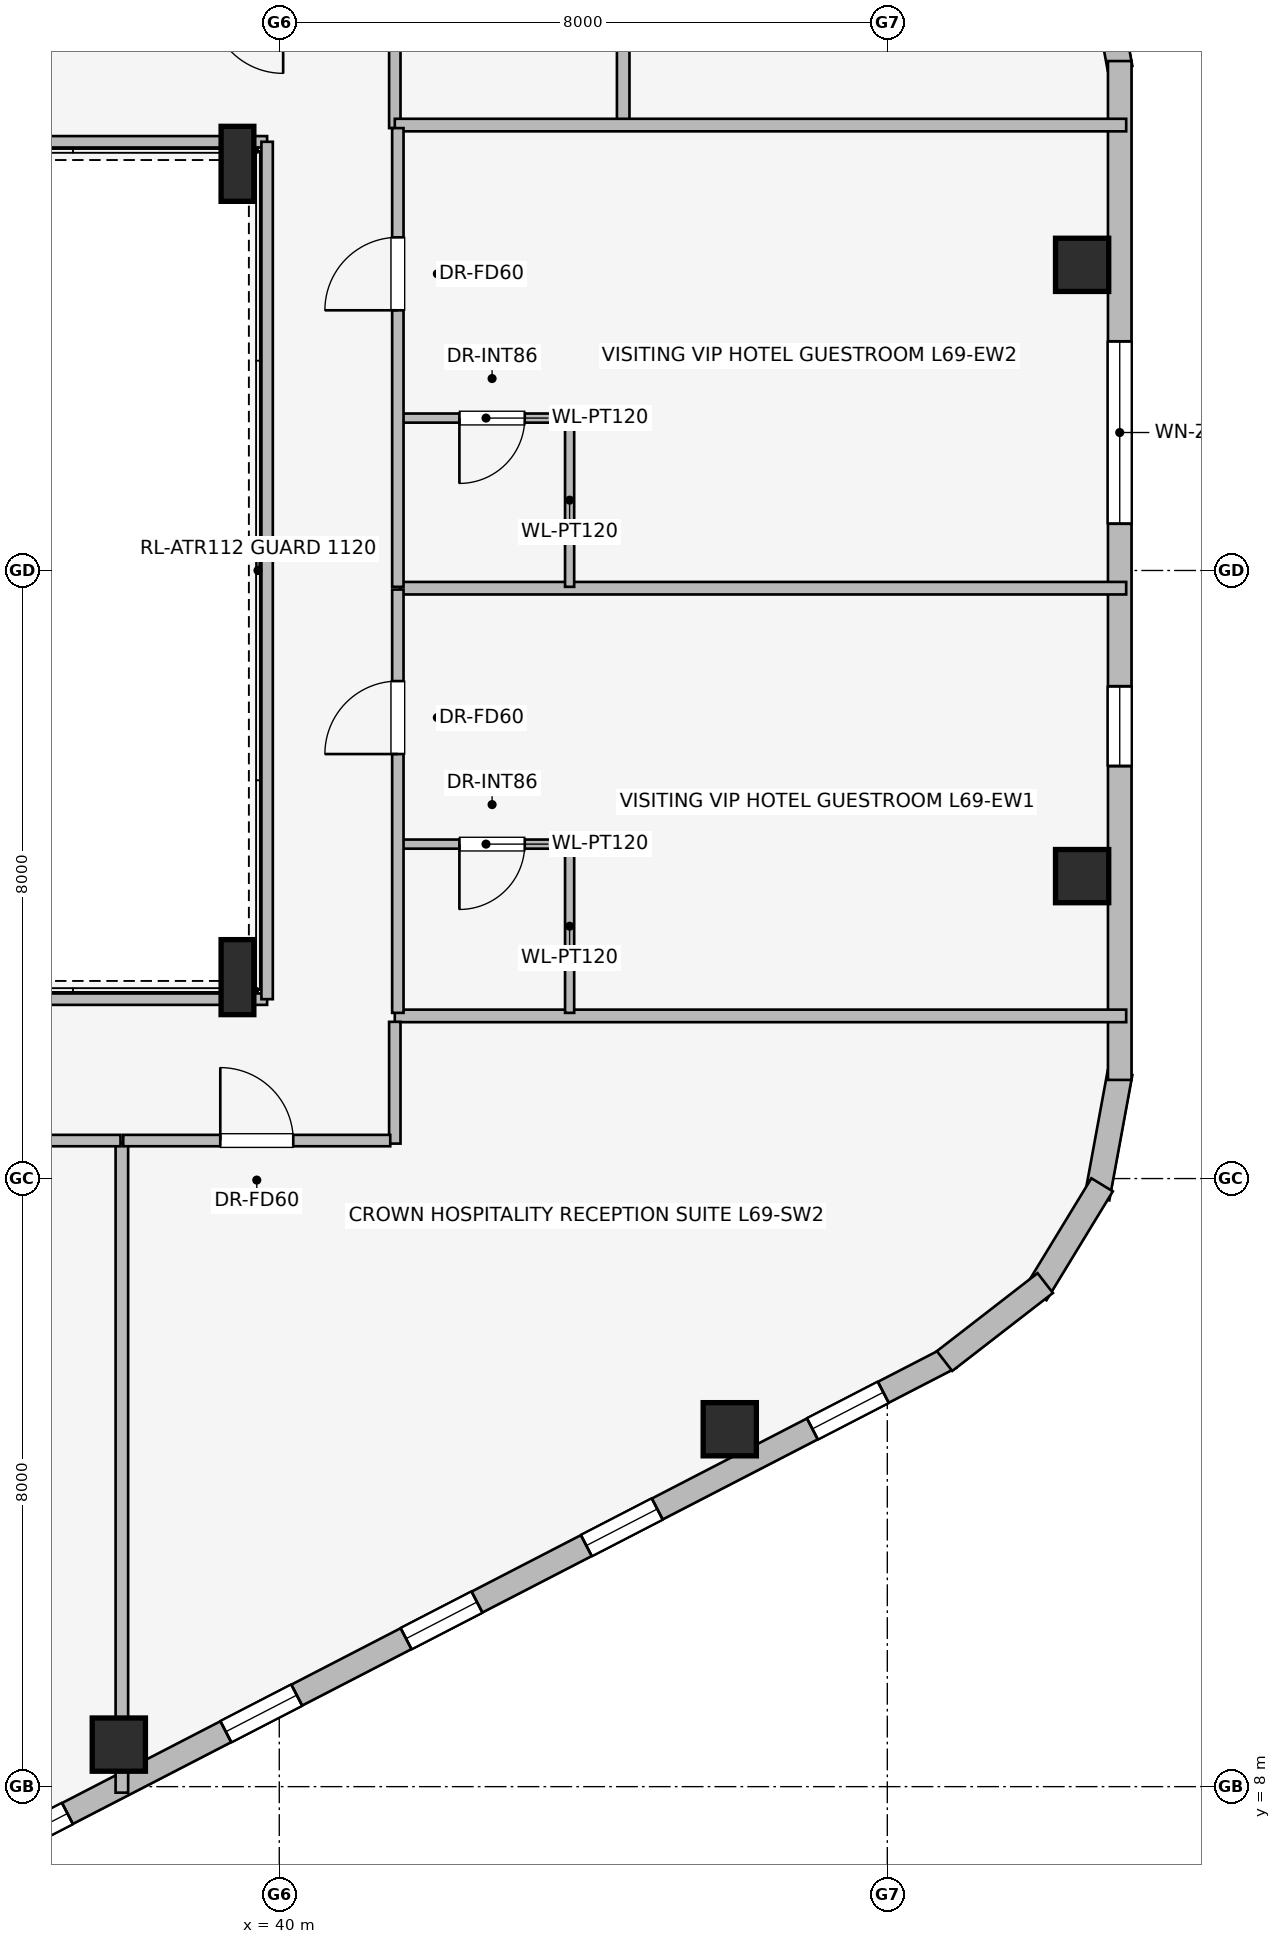
"""IFC4 building model, lengths in metres.
Left out: names, types, materials, properties, quantities, classifications, styles, units other than length and angle.
Written with IfcOpenShell. Run it as: python <this file> out.ifc"""

import sys

from ifc_helpers import new_model, si_unit, direction, frame, frame_2d, origin, origin_2d, place, context, subcontext, project, spatial, rectangle, i_section, extrude, element, fill, save


model = new_model("IFC4")
c1 = context("Model", 3, precision=1e-05, world=origin(), true_north=direction((0.0, 1.0)))
c2 = subcontext(c1, "Body", "Model", "MODEL_VIEW")
j1 = project(units=[si_unit("LENGTHUNIT", "METRE"), si_unit("PLANEANGLEUNIT", "RADIAN")], contexts=[c1])
p1 = place(None, origin())
s1 = spatial("IfcSite", under=j1, at=p1, CompositionType="ELEMENT")
p2 = place(p1, origin())
s2 = spatial("IfcBuilding", under=s1, at=p2, CompositionType="ELEMENT")
p3 = place(p2, frame((0.0, 0.0, 252.55)))
s3 = spatial("IfcBuildingStorey", under=s2, at=p3, CompositionType="ELEMENT", Elevation=252.55)
for number, where, z_axis, x_axis in (
    (1, (37.889, 8.553, 0.0), (0.0, 0.0, 1.0), (1.0, 0.0, 0.0)),
    (2, (45.927, 12.702, 0.0), (0.0, 0.0, 1.0), (1.0, 0.0, 0.0)),
    (3, (50.563, 19.979, 0.0), (0.0, 0.0, 1.0), (1.0, 0.0, 0.0)),
    (4, (50.563, 28.021, 0.0), (0.0, 0.0, 1.0), (1.0, 0.0, 0.0)),
):
    element("IfcColumn", number, at=place(p3, frame(where, z_axis=z_axis, x_axis=x_axis)), inside=s3, PredefinedType="COLUMN", context=c2, shape_type="SweptSolid", body=[
        extrude(rectangle(XDim=0.7, YDim=0.7, at=origin_2d()), origin(), (0.0, 0.0, 1.0), 3.55),
    ])
for number, where, z_axis, x_axis in (
    (5, (39.45, 18.65, 0.0), (0.0, 0.0, 1.0), (1.0, 0.0, 0.0)),
    (6, (39.45, 29.35, 0.0), (0.0, 0.0, 1.0), (1.0, 0.0, 0.0)),
):
    element("IfcColumn", number, at=place(p3, frame(where, z_axis=z_axis, x_axis=x_axis)), inside=s3, PredefinedType="COLUMN", context=c2, shape_type="SweptSolid", body=[
        extrude(i_section(OverallWidth=0.431, OverallDepth=0.987, WebThickness=0.034, FlangeThickness=0.062, at=origin_2d()), origin(), (0.0, 0.0, 1.0), 3.55),
    ])
p4 = place(p3, frame((50.759, 32.257, 0.0), z_axis=(0.0, 0.0, 1.0), x_axis=(0.180691763044, -0.983539773862, 0.0)))
e7 = element("IfcWall", 7, at=p4, inside=s3, PredefinedType="STANDARD", context=c2, shape_type="SweptSolid", body=[
    extrude(rectangle(XDim=1.677, YDim=0.33, at=frame_2d((0.838, 0.0))), origin(), (0.0, 0.0, 1.0), 3.29),
])
p5 = place(p3, frame((48.834, 13.646, 0.0), z_axis=(0.0, 0.0, 1.0), x_axis=(-0.888581481622, -0.458718814218, 0.0)))
e8 = element("IfcWall", 8, at=p5, inside=s3, PredefinedType="STANDARD", context=c2, shape_type="SweptSolid", body=[
    extrude(rectangle(XDim=15.077, YDim=0.31, at=frame_2d((7.539, 0.0))), origin(), (0.0, 0.0, 1.0), 3.29),
])
p6 = place(p5, frame((0.998, 0.0, 0.75)))
e9 = element("IfcOpeningElement", 9, at=p6, cuts=e8, PredefinedType="OPENING", context=c2, shape_type="SweptSolid", body=[
    extrude(rectangle(XDim=1.05, YDim=1.4, at=frame_2d((0.525, 0.7))), frame((0.0, 0.165, 0.0), z_axis=(0.0, -1.0, 0.0), x_axis=(1.0, 0.0, 0.0)), (0.0, 0.0, 1.0), 0.33),
])
p7 = place(p5, frame((4.345, 0.0, 0.75)))
e10 = element("IfcOpeningElement", 10, at=p7, cuts=e8, PredefinedType="OPENING", context=c2, shape_type="SweptSolid", body=[
    extrude(rectangle(XDim=1.05, YDim=1.4, at=frame_2d((0.525, 0.7))), frame((0.0, 0.165, 0.0), z_axis=(0.0, -1.0, 0.0), x_axis=(1.0, 0.0, 0.0)), (0.0, 0.0, 1.0), 0.33),
])
p8 = place(p5, frame((7.014, 0.0, 0.75)))
e11 = element("IfcOpeningElement", 11, at=p8, cuts=e8, PredefinedType="OPENING", context=c2, shape_type="SweptSolid", body=[
    extrude(rectangle(XDim=1.05, YDim=1.4, at=frame_2d((0.525, 0.7))), frame((0.0, 0.165, 0.0), z_axis=(0.0, -1.0, 0.0), x_axis=(1.0, 0.0, 0.0)), (0.0, 0.0, 1.0), 0.33),
])
p9 = place(p5, frame((9.683, 0.0, 0.75)))
e12 = element("IfcOpeningElement", 12, at=p9, cuts=e8, PredefinedType="OPENING", context=c2, shape_type="SweptSolid", body=[
    extrude(rectangle(XDim=1.05, YDim=1.4, at=frame_2d((0.525, 0.7))), frame((0.0, 0.165, 0.0), z_axis=(0.0, -1.0, 0.0), x_axis=(1.0, 0.0, 0.0)), (0.0, 0.0, 1.0), 0.33),
])
p10 = place(p5, frame((13.078, 0.0, 0.75)))
e13 = element("IfcOpeningElement", 13, at=p10, cuts=e8, PredefinedType="OPENING", context=c2, shape_type="SweptSolid", body=[
    extrude(rectangle(XDim=1.05, YDim=1.4, at=frame_2d((0.525, 0.7))), frame((0.0, 0.165, 0.0), z_axis=(0.0, -1.0, 0.0), x_axis=(1.0, 0.0, 0.0)), (0.0, 0.0, 1.0), 0.33),
])
p11 = place(p3, frame((51.062, 17.392, 0.0), z_axis=(0.0, 0.0, 1.0), x_axis=(-0.180691763044, -0.983539773862, 0.0)))
e14 = element("IfcWall", 14, at=p11, inside=s3, PredefinedType="STANDARD", context=c2, shape_type="SweptSolid", body=[
    extrude(rectangle(XDim=1.677, YDim=0.33, at=frame_2d((0.838, 0.0))), origin(), (0.0, 0.0, 1.0), 3.29),
])
p12 = place(p3, frame((50.826, 15.918, 0.0), z_axis=(0.0, 0.0, 1.0), x_axis=(-0.520325409202, -0.853968072318, 0.0)))
e15 = element("IfcWall", 15, at=p12, inside=s3, PredefinedType="STANDARD", context=c2, shape_type="SweptSolid", body=[
    extrude(rectangle(XDim=1.678, YDim=0.33, at=frame_2d((0.839, 0.0))), origin(), (0.0, 0.0, 1.0), 3.29),
])
p13 = place(p3, frame((50.078, 14.625, 0.0), z_axis=(0.0, 0.0, 1.0), x_axis=(-0.790691856293, -0.61221433207, 0.0)))
e16 = element("IfcWall", 16, at=p13, inside=s3, PredefinedType="STANDARD", context=c2, shape_type="SweptSolid", body=[
    extrude(rectangle(XDim=1.676, YDim=0.33, at=frame_2d((0.838, 0.0))), origin(), (0.0, 0.0, 1.0), 3.29),
])
p14 = place(p3, frame((51.058, 30.702, 0.0), z_axis=(0.0, 0.0, 1.0), x_axis=(0.0, -1.0, 0.0)))
e17 = element("IfcWall", 17, at=p14, inside=s3, PredefinedType="STANDARD", context=c2, shape_type="SweptSolid", body=[
    extrude(rectangle(XDim=13.404, YDim=0.31, at=frame_2d((6.702, 0.0))), origin(), (0.0, 0.0, 1.0), 3.29),
])
p15 = place(p14, frame((3.687, 0.0, 0.75)))
e18 = element("IfcOpeningElement", 18, at=p15, cuts=e17, PredefinedType="OPENING", context=c2, shape_type="SweptSolid", body=[
    extrude(rectangle(XDim=2.4, YDim=1.6, at=frame_2d((1.2, 0.8))), frame((0.0, 0.165, 0.0), z_axis=(0.0, -1.0, 0.0), x_axis=(1.0, 0.0, 0.0)), (0.0, 0.0, 1.0), 0.33),
])
p16 = place(p14, frame((8.225, 0.0, 0.75)))
e19 = element("IfcOpeningElement", 19, at=p16, cuts=e17, PredefinedType="OPENING", context=c2, shape_type="SweptSolid", body=[
    extrude(rectangle(XDim=1.05, YDim=1.4, at=frame_2d((0.525, 0.7))), frame((0.0, 0.165, 0.0), z_axis=(0.0, -1.0, 0.0), x_axis=(1.0, 0.0, 0.0)), (0.0, 0.0, 1.0), 0.33),
])
p17 = place(p3, frame((27.675, 18.36, 0.0), z_axis=(0.0, 0.0, 1.0), x_axis=(1.0, 0.0, 0.0)))
e20 = element("IfcWall", 20, at=p17, inside=s3, PredefinedType="PARTITIONING", context=c2, shape_type="SweptSolid", body=[
    extrude(rectangle(XDim=12.165, YDim=0.15, at=frame_2d((6.083, 0.0))), origin(), (0.0, 0.0, 1.0), 2.431),
])
p18 = place(p3, frame((39.84, 29.64, 0.0), z_axis=(0.0, 0.0, 1.0), x_axis=(-1.0, 0.0, 0.0)))
e21 = element("IfcWall", 21, at=p18, inside=s3, PredefinedType="PARTITIONING", context=c2, shape_type="SweptSolid", body=[
    extrude(rectangle(XDim=12.203, YDim=0.15, at=frame_2d((6.102, 0.0))), origin(), (0.0, 0.0, 1.0), 2.431),
])
p19 = place(p3, frame((39.84, 18.36, 0.0), z_axis=(0.0, 0.0, 1.0), x_axis=(0.0, 1.0, 0.0)))
e22 = element("IfcWall", 22, at=p19, inside=s3, PredefinedType="PARTITIONING", context=c2, shape_type="SweptSolid", body=[
    extrude(rectangle(XDim=11.28, YDim=0.15, at=frame_2d((5.64, 0.0))), origin(), (0.0, 0.0, 1.0), 3.29),
])
p20 = place(p3, frame((41.52, 29.82, 0.0), z_axis=(0.0, 0.0, 1.0), x_axis=(0.0, 1.0, 0.0)))
e23 = element("IfcWall", 23, at=p20, inside=s3, PredefinedType="PARTITIONING", context=c2, shape_type="SweptSolid", body=[
    extrude(rectangle(XDim=1.72, YDim=0.15, at=frame_2d((0.86, 0.0))), origin(), (0.0, 0.0, 1.0), 3.29),
])
p21 = place(p3, frame((44.525, 29.89, 0.0), z_axis=(0.0, 0.0, 1.0), x_axis=(0.0, 1.0, 0.0)))
e24 = element("IfcWall", 24, at=p21, inside=s3, PredefinedType="PARTITIONING", context=c2, shape_type="SweptSolid", body=[
    extrude(rectangle(XDim=6.784, YDim=0.165, at=frame_2d((3.392, 0.0))), origin(), (0.0, 0.0, 1.0), 3.29),
])
for number, where, z_axis, x_axis in (
    (25, (41.52, 18.14, 0.0), (0.0, 0.0, 1.0), (1.0, 0.0, 0.0)),
    (26, (41.52, 29.86, 0.0), (0.0, 0.0, 1.0), (1.0, 0.0, 0.0)),
):
    element("IfcWall", number, at=place(p3, frame(where, z_axis=z_axis, x_axis=x_axis)), inside=s3, PredefinedType="PARTITIONING", context=c2, shape_type="SweptSolid", body=[
        extrude(rectangle(XDim=9.623, YDim=0.165, at=frame_2d((4.812, 0.0))), origin(), (0.0, 0.0, 1.0), 3.29),
    ])
p22 = place(p3, frame((41.59, 23.767, 0.0), z_axis=(0.0, 0.0, 1.0), x_axis=(1.0, 0.0, 0.0)))
e27 = element("IfcWall", 27, at=p22, inside=s3, PredefinedType="PARTITIONING", context=c2, shape_type="SweptSolid", body=[
    extrude(rectangle(XDim=9.553, YDim=0.165, at=frame_2d((4.776, 0.0))), origin(), (0.0, 0.0, 1.0), 2.594),
])
p23 = place(p3, frame((43.82, 18.18, 0.0), z_axis=(0.0, 0.0, 1.0), x_axis=(0.0, 1.0, 0.0)))
e28 = element("IfcWall", 28, at=p23, inside=s3, PredefinedType="PARTITIONING", context=c2, shape_type="SweptSolid", body=[
    extrude(rectangle(XDim=2.28, YDim=0.12, at=frame_2d((1.14, 0.0))), origin(), (0.0, 0.0, 1.0), 2.887),
])
p24 = place(p3, frame((43.88, 20.4, 0.0), z_axis=(0.0, 0.0, 1.0), x_axis=(-1.0, 0.0, 0.0)))
e29 = element("IfcWall", 29, at=p24, inside=s3, PredefinedType="PARTITIONING", context=c2, shape_type="SweptSolid", body=[
    extrude(rectangle(XDim=2.32, YDim=0.12, at=frame_2d((1.16, 0.0))), origin(), (0.0, 0.0, 1.0), 3.29),
])
p25 = place(p24, frame((0.65, 0.0, 0.0)))
e30 = element("IfcOpeningElement", 30, at=p25, cuts=e29, PredefinedType="OPENING", context=c2, shape_type="SweptSolid", body=[
    extrude(rectangle(XDim=0.86, YDim=2.0, at=frame_2d((0.43, 1.0))), frame((0.0, 0.07, 0.0), z_axis=(0.0, -1.0, 0.0), x_axis=(1.0, 0.0, 0.0)), (0.0, 0.0, 1.0), 0.14),
])
p26 = place(p3, frame((41.56, 18.18, 0.0), z_axis=(0.0, 0.0, 1.0), x_axis=(0.0, 1.0, 0.0)))
e31 = element("IfcWall", 31, at=p26, inside=s3, PredefinedType="PARTITIONING", context=c2, shape_type="SweptSolid", body=[
    extrude(rectangle(XDim=5.569, YDim=0.15, at=frame_2d((2.785, 0.0))), origin(), (0.0, 0.0, 1.0), 3.29),
])
p27 = place(p26, frame((3.405, 0.0, 0.0)))
e32 = element("IfcOpeningElement", 32, at=p27, cuts=e31, PredefinedType="OPENING", context=c2, shape_type="SweptSolid", body=[
    extrude(rectangle(XDim=0.96, YDim=2.0, at=frame_2d((0.48, 1.0))), frame((0.0, 0.085, 0.0), z_axis=(0.0, -1.0, 0.0), x_axis=(1.0, 0.0, 0.0)), (0.0, 0.0, 1.0), 0.17),
])
p28 = place(p3, frame((43.82, 23.785, 0.0), z_axis=(0.0, 0.0, 1.0), x_axis=(0.0, 1.0, 0.0)))
e33 = element("IfcWall", 33, at=p28, inside=s3, PredefinedType="PARTITIONING", context=c2, shape_type="SweptSolid", body=[
    extrude(rectangle(XDim=2.28, YDim=0.12, at=frame_2d((1.14, 0.0))), origin(), (0.0, 0.0, 1.0), 2.887),
])
p29 = place(p3, frame((43.88, 26.005, 0.0), z_axis=(0.0, 0.0, 1.0), x_axis=(-1.0, 0.0, 0.0)))
e34 = element("IfcWall", 34, at=p29, inside=s3, PredefinedType="PARTITIONING", context=c2, shape_type="SweptSolid", body=[
    extrude(rectangle(XDim=2.32, YDim=0.12, at=frame_2d((1.16, 0.0))), origin(), (0.0, 0.0, 1.0), 3.29),
])
p30 = place(p29, frame((0.65, 0.0, 0.0)))
e35 = element("IfcOpeningElement", 35, at=p30, cuts=e34, PredefinedType="OPENING", context=c2, shape_type="SweptSolid", body=[
    extrude(rectangle(XDim=0.86, YDim=2.0, at=frame_2d((0.43, 1.0))), frame((0.0, 0.07, 0.0), z_axis=(0.0, -1.0, 0.0), x_axis=(1.0, 0.0, 0.0)), (0.0, 0.0, 1.0), 0.14),
])
p31 = place(p3, frame((41.56, 23.785, 0.0), z_axis=(0.0, 0.0, 1.0), x_axis=(0.0, 1.0, 0.0)))
e36 = element("IfcWall", 36, at=p31, inside=s3, PredefinedType="PARTITIONING", context=c2, shape_type="SweptSolid", body=[
    extrude(rectangle(XDim=6.035, YDim=0.15, at=frame_2d((3.018, 0.0))), origin(), (0.0, 0.0, 1.0), 3.29),
])
p32 = place(p31, frame((3.638, 0.0, 0.0)))
e37 = element("IfcOpeningElement", 37, at=p32, cuts=e36, PredefinedType="OPENING", context=c2, shape_type="SweptSolid", body=[
    extrude(rectangle(XDim=0.96, YDim=2.0, at=frame_2d((0.48, 1.0))), frame((0.0, 0.085, 0.0), z_axis=(0.0, -1.0, 0.0), x_axis=(1.0, 0.0, 0.0)), (0.0, 0.0, 1.0), 0.17),
])
p33 = place(p3, frame((41.52, 16.46, 0.0), z_axis=(0.0, 0.0, 1.0), x_axis=(0.0, 1.0, 0.0)))
e38 = element("IfcWall", 38, at=p33, inside=s3, PredefinedType="PARTITIONING", context=c2, shape_type="SweptSolid", body=[
    extrude(rectangle(XDim=1.602, YDim=0.15, at=frame_2d((0.801, 0.0))), origin(), (0.0, 0.0, 1.0), 3.29),
])
p34 = place(p3, frame((37.929, 7.921, 0.0), z_axis=(0.0, 0.0, 1.0), x_axis=(0.0, 1.0, 0.0)))
e39 = element("IfcWall", 39, at=p34, inside=s3, PredefinedType="PARTITIONING", context=c2, shape_type="SweptSolid", body=[
    extrude(rectangle(XDim=8.549, YDim=0.165, at=frame_2d((4.274, 0.0))), origin(), (0.0, 0.0, 1.0), 2.679),
])
p35 = place(p3, frame((32.85, 16.5, 0.0), z_axis=(0.0, 0.0, 1.0), x_axis=(1.0, 0.0, 0.0)))
e40 = element("IfcWall", 40, at=p35, inside=s3, PredefinedType="PARTITIONING", context=c2, shape_type="SweptSolid", body=[
    extrude(rectangle(XDim=5.061, YDim=0.15, at=frame_2d((2.53, 0.0))), origin(), (0.0, 0.0, 1.0), 3.29),
])
p36 = place(p35, frame((2.051, 0.0, 0.0)))
e41 = element("IfcOpeningElement", 41, at=p36, cuts=e40, PredefinedType="OPENING", context=c2, shape_type="SweptSolid", body=[
    extrude(rectangle(XDim=0.96, YDim=2.0, at=frame_2d((0.48, 1.0))), frame((0.0, 0.085, 0.0), z_axis=(0.0, -1.0, 0.0), x_axis=(1.0, 0.0, 0.0)), (0.0, 0.0, 1.0), 0.17),
])
p37 = place(p3, frame((37.947, 16.5, 0.0), z_axis=(0.0, 0.0, 1.0), x_axis=(1.0, 0.0, 0.0)))
e42 = element("IfcWall", 42, at=p37, inside=s3, PredefinedType="PARTITIONING", context=c2, shape_type="SweptSolid", body=[
    extrude(rectangle(XDim=3.513, YDim=0.15, at=frame_2d((1.756, 0.0))), origin(), (0.0, 0.0, 1.0), 3.29),
])
p38 = place(p37, frame((1.277, 0.0, 0.0)))
e43 = element("IfcOpeningElement", 43, at=p38, cuts=e42, PredefinedType="OPENING", context=c2, shape_type="SweptSolid", body=[
    extrude(rectangle(XDim=0.96, YDim=2.0, at=frame_2d((0.48, 1.0))), frame((0.0, 0.085, 0.0), z_axis=(0.0, -1.0, 0.0), x_axis=(1.0, 0.0, 0.0)), (0.0, 0.0, 1.0), 0.17),
])
p39 = place(p6, origin())
e44 = element("IfcWindow", 44, at=p39, inside=s3, PartitioningType="SINGLE_PANEL", PredefinedType="WINDOW", context=c2, shape_type="SweptSolid", body=[
    extrude(rectangle(XDim=1.05, YDim=1.4, at=frame_2d((0.525, 0.7))), frame((0.0, 0.03, 0.0), z_axis=(0.0, -1.0, 0.0), x_axis=(1.0, 0.0, 0.0)), (0.0, 0.0, 1.0), 0.06),
])
fill(e9, e44)
p40 = place(p7, origin())
e45 = element("IfcWindow", 45, at=p40, inside=s3, PartitioningType="SINGLE_PANEL", PredefinedType="WINDOW", context=c2, shape_type="SweptSolid", body=[
    extrude(rectangle(XDim=1.05, YDim=1.4, at=frame_2d((0.525, 0.7))), frame((0.0, 0.03, 0.0), z_axis=(0.0, -1.0, 0.0), x_axis=(1.0, 0.0, 0.0)), (0.0, 0.0, 1.0), 0.06),
])
fill(e10, e45)
p41 = place(p8, origin())
e46 = element("IfcWindow", 46, at=p41, inside=s3, PartitioningType="SINGLE_PANEL", PredefinedType="WINDOW", context=c2, shape_type="SweptSolid", body=[
    extrude(rectangle(XDim=1.05, YDim=1.4, at=frame_2d((0.525, 0.7))), frame((0.0, 0.03, 0.0), z_axis=(0.0, -1.0, 0.0), x_axis=(1.0, 0.0, 0.0)), (0.0, 0.0, 1.0), 0.06),
])
fill(e11, e46)
p42 = place(p9, origin())
e47 = element("IfcWindow", 47, at=p42, inside=s3, PartitioningType="SINGLE_PANEL", PredefinedType="WINDOW", context=c2, shape_type="SweptSolid", body=[
    extrude(rectangle(XDim=1.05, YDim=1.4, at=frame_2d((0.525, 0.7))), frame((0.0, 0.03, 0.0), z_axis=(0.0, -1.0, 0.0), x_axis=(1.0, 0.0, 0.0)), (0.0, 0.0, 1.0), 0.06),
])
fill(e12, e47)
p43 = place(p10, origin())
e48 = element("IfcWindow", 48, at=p43, inside=s3, PartitioningType="SINGLE_PANEL", PredefinedType="WINDOW", context=c2, shape_type="SweptSolid", body=[
    extrude(rectangle(XDim=1.05, YDim=1.4, at=frame_2d((0.525, 0.7))), frame((0.0, 0.03, 0.0), z_axis=(0.0, -1.0, 0.0), x_axis=(1.0, 0.0, 0.0)), (0.0, 0.0, 1.0), 0.06),
])
fill(e13, e48)
p44 = place(p15, origin())
e49 = element("IfcWindow", 49, at=p44, inside=s3, PartitioningType="SINGLE_PANEL", PredefinedType="WINDOW", context=c2, shape_type="SweptSolid", body=[
    extrude(rectangle(XDim=2.4, YDim=1.6, at=frame_2d((1.2, 0.8))), frame((0.0, 0.03, 0.0), z_axis=(0.0, -1.0, 0.0), x_axis=(1.0, 0.0, 0.0)), (0.0, 0.0, 1.0), 0.06),
])
fill(e18, e49)
p45 = place(p16, origin())
e50 = element("IfcWindow", 50, at=p45, inside=s3, PartitioningType="SINGLE_PANEL", PredefinedType="WINDOW", context=c2, shape_type="SweptSolid", body=[
    extrude(rectangle(XDim=1.05, YDim=1.4, at=frame_2d((0.525, 0.7))), frame((0.0, 0.03, 0.0), z_axis=(0.0, -1.0, 0.0), x_axis=(1.0, 0.0, 0.0)), (0.0, 0.0, 1.0), 0.06),
])
fill(e19, e50)
p46 = place(p25, origin())
e51 = element("IfcDoor", 51, at=p46, inside=s3, OperationType="SINGLE_SWING_RIGHT", PredefinedType="DOOR", context=c2, shape_type="SweptSolid", body=[
    extrude(rectangle(XDim=0.86, YDim=2.0, at=frame_2d((0.43, 1.0))), frame((0.0, 0.025, 0.0), z_axis=(0.0, -1.0, 0.0), x_axis=(1.0, 0.0, 0.0)), (0.0, 0.0, 1.0), 0.05),
])
fill(e30, e51)
p47 = place(p27, origin())
e52 = element("IfcDoor", 52, at=p47, inside=s3, OperationType="SINGLE_SWING_LEFT", PredefinedType="DOOR", context=c2, shape_type="SweptSolid", body=[
    extrude(rectangle(XDim=0.96, YDim=2.0, at=frame_2d((0.48, 1.0))), frame((0.0, 0.025, 0.0), z_axis=(0.0, -1.0, 0.0), x_axis=(1.0, 0.0, 0.0)), (0.0, 0.0, 1.0), 0.05),
])
fill(e32, e52)
p48 = place(p30, origin())
e53 = element("IfcDoor", 53, at=p48, inside=s3, OperationType="SINGLE_SWING_RIGHT", PredefinedType="DOOR", context=c2, shape_type="SweptSolid", body=[
    extrude(rectangle(XDim=0.86, YDim=2.0, at=frame_2d((0.43, 1.0))), frame((0.0, 0.025, 0.0), z_axis=(0.0, -1.0, 0.0), x_axis=(1.0, 0.0, 0.0)), (0.0, 0.0, 1.0), 0.05),
])
fill(e35, e53)
p49 = place(p32, origin())
e54 = element("IfcDoor", 54, at=p49, inside=s3, OperationType="SINGLE_SWING_LEFT", PredefinedType="DOOR", context=c2, shape_type="SweptSolid", body=[
    extrude(rectangle(XDim=0.96, YDim=2.0, at=frame_2d((0.48, 1.0))), frame((0.0, 0.025, 0.0), z_axis=(0.0, -1.0, 0.0), x_axis=(1.0, 0.0, 0.0)), (0.0, 0.0, 1.0), 0.05),
])
fill(e37, e54)
p50 = place(p38, origin())
e55 = element("IfcDoor", 55, at=p50, inside=s3, OperationType="SINGLE_SWING_LEFT", PredefinedType="DOOR", context=c2, shape_type="SweptSolid", body=[
    extrude(rectangle(XDim=0.96, YDim=2.0, at=frame_2d((0.48, 1.0))), frame((0.0, 0.025, 0.0), z_axis=(0.0, -1.0, 0.0), x_axis=(1.0, 0.0, 0.0)), (0.0, 0.0, 1.0), 0.05),
])
fill(e43, e55)
save(model, sys.argv[1])
